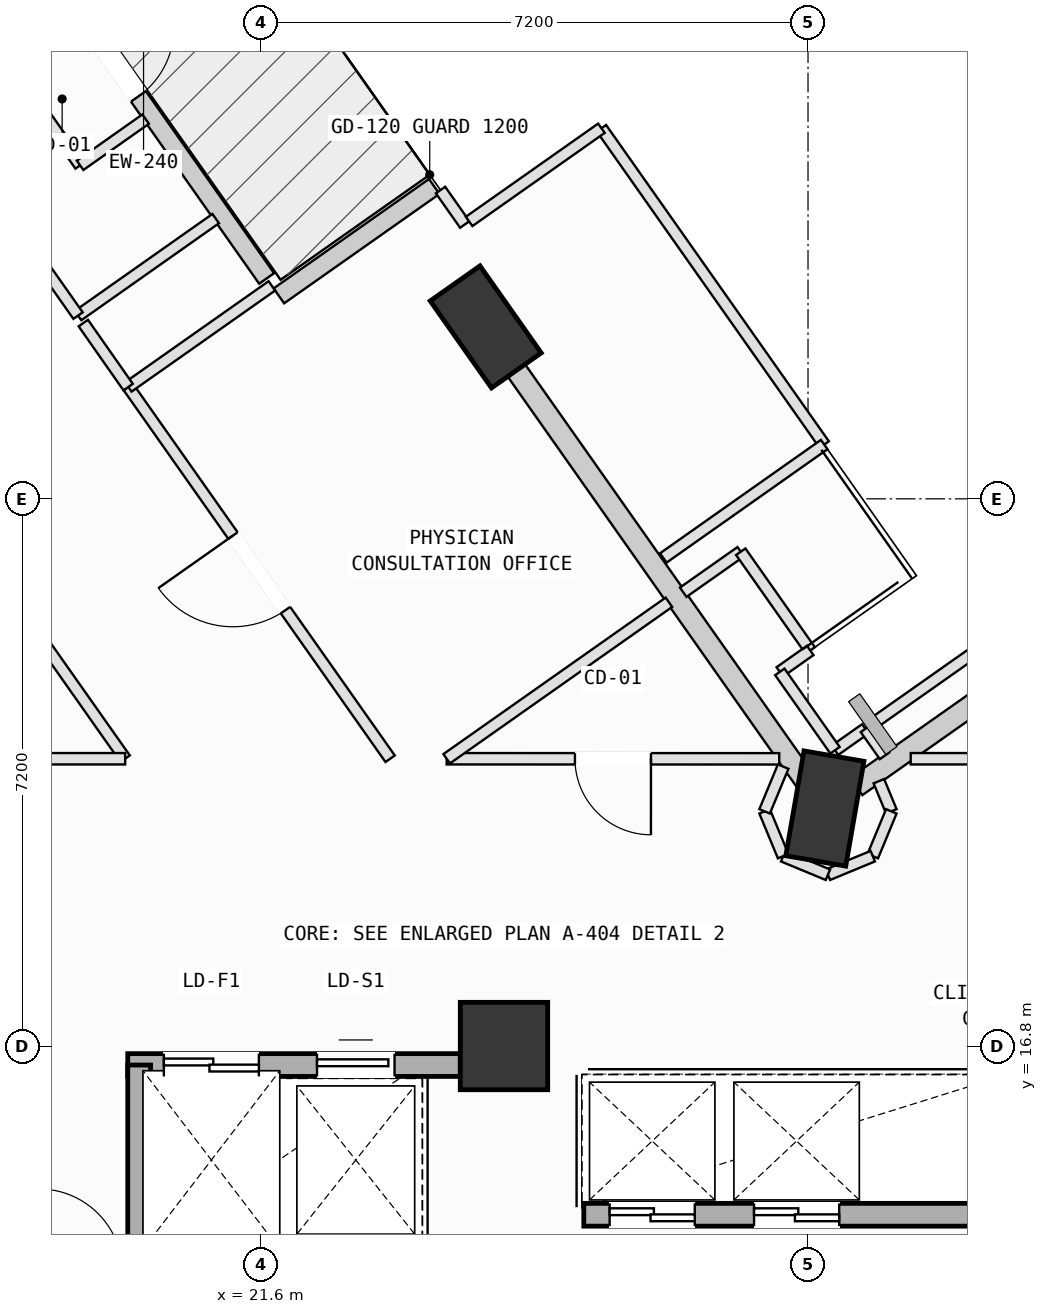
"""IFC4 building model, lengths in metres.
Left out: names, types, materials, properties, quantities, classifications, styles, units other than length and angle.
Written with IfcOpenShell. Run it as: python <this file> out.ifc"""

import sys

from ifc_helpers import new_model, si_unit, direction, frame, frame_2d, origin, origin_2d, place, context, subcontext, project, spatial, rectangle, extrude, element, fill, save


model = new_model("IFC4")
c1 = context("Model", 3, precision=1e-05, world=origin(), true_north=direction((0.0, 1.0)))
c2 = subcontext(c1, "Body", "Model", "MODEL_VIEW")
j1 = project(units=[si_unit("LENGTHUNIT", "METRE"), si_unit("PLANEANGLEUNIT", "RADIAN")], contexts=[c1])
p1 = place(None, origin())
s1 = spatial("IfcSite", under=j1, at=p1, CompositionType="ELEMENT")
p2 = place(p1, origin())
s2 = spatial("IfcBuilding", under=s1, at=p2, CompositionType="ELEMENT")
p3 = place(p2, frame((0.0, 0.0, 173.8)))
s3 = spatial("IfcBuildingStorey", under=s2, at=p3, CompositionType="ELEMENT", Elevation=173.8)
p4 = place(p3, frame((24.8, 16.8, 0.0), z_axis=(0.0, 0.0, 1.0), x_axis=(1.0, 0.0, 0.0)))
e1 = element("IfcColumn", 1, at=p4, inside=s3, PredefinedType="COLUMN", context=c2, shape_type="SweptSolid", body=[
    extrude(rectangle(XDim=1.15, YDim=1.15, at=origin_2d()), origin(), (0.0, 0.0, 1.0), 4.0),
])
p5 = place(p3, frame((29.022, 19.925, 0.002), z_axis=(0.020335525631, -0.018808834518, 0.999616273448), x_axis=(-0.606869387949, 0.794332861658, 0.027291955989)))
e2 = element("IfcColumn", 2, at=p5, inside=s3, PredefinedType="COLUMN", context=c2, shape_type="SweptSolid", body=[
    extrude(rectangle(XDim=1.4, YDim=0.8, at=origin_2d()), origin(), (0.0, 0.0, 1.0), 3.998),
])
p6 = place(p3, frame((24.56, 26.262, 0.002), z_axis=(-0.005738432057, -0.037482949817, 0.999280790804), x_axis=(-0.445441829309, 0.894773866019, 0.031004925272)))
e3 = element("IfcColumn", 3, at=p6, inside=s3, PredefinedType="COLUMN", context=c2, shape_type="SweptSolid", body=[
    extrude(rectangle(XDim=1.4, YDim=0.8, at=origin_2d()), origin(), (0.0, 0.0, 1.0), 3.999),
])
p7 = place(p3, frame((17.67, 32.59, 0.0), z_axis=(0.0, 0.0, 1.0), x_axis=(0.57573667461, -0.817635176292, 0.0)))
e4 = element("IfcWall", 4, at=p7, inside=s3, PredefinedType="SOLIDWALL", context=c2, shape_type="SweptSolid", body=[
    extrude(rectangle(XDim=6.96, YDim=0.24, at=frame_2d((3.48, 0.0))), origin(), (0.0, 0.0, 1.0), 3.265),
])
p8 = place(p7, frame((2.93, 0.0, 0.0)))
e5 = element("IfcOpeningElement", 5, at=p8, cuts=e4, PredefinedType="OPENING", context=c2, shape_type="SweptSolid", body=[
    extrude(rectangle(XDim=1.1, YDim=2.15, at=frame_2d((0.55, 1.075))), frame((0.0, 0.13, 0.0), z_axis=(0.0, -1.0, 0.0), x_axis=(1.0, 0.0, 0.0)), (0.0, 0.0, 1.0), 0.26),
])
p9 = place(p3, frame((21.838, 26.671, 0.0), z_axis=(0.0, 0.0, 1.0), x_axis=(0.817627652567, 0.575747359314, 0.0)))
e6 = element("IfcWall", 6, at=p9, inside=s3, PredefinedType="SOLIDWALL", context=c2, shape_type="SweptSolid", body=[
    extrude(rectangle(XDim=2.5, YDim=0.24, at=frame_2d((1.25, 0.0))), origin(), (0.0, 0.0, 1.0), 3.265),
])
p10 = place(p3, frame((29.435, 20.216, 0.0), z_axis=(0.0, 0.0, 1.0), x_axis=(0.817631441068, 0.575741979169, 0.0)))
e7 = element("IfcWall", 7, at=p10, inside=s3, PredefinedType="SOLIDWALL", context=c2, shape_type="SweptSolid", body=[
    extrude(rectangle(XDim=5.96, YDim=0.28, at=frame_2d((2.98, 0.0))), origin(), (0.0, 0.0, 1.0), 3.265),
])
p11 = place(p3, frame((28.767, 20.287, 0.0), z_axis=(0.0, 0.0, 1.0), x_axis=(-0.575707206598, 0.817655925357, 0.0)))
e8 = element("IfcWall", 8, at=p11, inside=s3, PredefinedType="SOLIDWALL", context=c2, shape_type="SweptSolid", body=[
    extrude(rectangle(XDim=6.76, YDim=0.28, at=frame_2d((3.38, 0.0))), origin(), (0.0, 0.0, 1.0), 3.265),
])
p12 = place(p3, frame((19.85, 16.55, 0.0), z_axis=(0.0, 0.0, 1.0), x_axis=(1.0, 0.0, 0.0)))
e9 = element("IfcWall", 9, at=p12, inside=s3, PredefinedType="SOLIDWALL", context=c2, shape_type="SweptSolid", body=[
    extrude(rectangle(XDim=4.375, YDim=0.3, at=frame_2d((2.188, 0.0))), origin(), (0.0, 0.0, 1.0), 3.78),
])
p13 = place(p12, frame((0.475, 0.0, 0.0)))
e10 = element("IfcOpeningElement", 10, at=p13, cuts=e9, PredefinedType="OPENING", context=c2, shape_type="SweptSolid", body=[
    extrude(rectangle(XDim=1.25, YDim=2.18, at=frame_2d((0.625, 1.09))), frame((0.0, 0.16, 0.0), z_axis=(0.0, -1.0, 0.0), x_axis=(1.0, 0.0, 0.0)), (0.0, 0.0, 1.0), 0.32),
])
p14 = place(p12, frame((2.49, 0.0, 0.0)))
e11 = element("IfcOpeningElement", 11, at=p14, cuts=e9, PredefinedType="OPENING", context=c2, shape_type="SweptSolid", body=[
    extrude(rectangle(XDim=1.02, YDim=2.12, at=frame_2d((0.51, 1.06))), frame((0.0, 0.16, 0.0), z_axis=(0.0, -1.0, 0.0), x_axis=(1.0, 0.0, 0.0)), (0.0, 0.0, 1.0), 0.32),
])
p15 = place(p3, frame((20.0, 13.82, 0.0), z_axis=(0.0, 0.0, 1.0), x_axis=(0.0, 1.0, 0.0)))
e12 = element("IfcWall", 12, at=p15, inside=s3, PredefinedType="SOLIDWALL", context=c2, shape_type="SweptSolid", body=[
    extrude(rectangle(XDim=2.73, YDim=0.3, at=frame_2d((1.365, 0.0))), origin(), (0.0, 0.0, 1.0), 3.78),
])
p16 = place(p3, frame((25.85, 14.58, 0.0), z_axis=(0.0, 0.0, 1.0), x_axis=(1.0, 0.0, 0.0)))
e13 = element("IfcWall", 13, at=p16, inside=s3, PredefinedType="SOLIDWALL", context=c2, shape_type="SweptSolid", body=[
    extrude(rectangle(XDim=5.45, YDim=0.3, at=frame_2d((2.725, 0.0))), origin(), (0.0, 0.0, 1.0), 3.78),
])
p17 = place(p16, frame((0.34, 0.0, 0.0)))
e14 = element("IfcOpeningElement", 14, at=p17, cuts=e13, PredefinedType="OPENING", context=c2, shape_type="SweptSolid", body=[
    extrude(rectangle(XDim=1.12, YDim=2.15, at=frame_2d((0.56, 1.075))), frame((0.0, 0.16, 0.0), z_axis=(0.0, -1.0, 0.0), x_axis=(1.0, 0.0, 0.0)), (0.0, 0.0, 1.0), 0.32),
])
p18 = place(p16, frame((2.24, 0.0, 0.0)))
e15 = element("IfcOpeningElement", 15, at=p18, cuts=e13, PredefinedType="OPENING", context=c2, shape_type="SweptSolid", body=[
    extrude(rectangle(XDim=1.12, YDim=2.15, at=frame_2d((0.56, 1.075))), frame((0.0, 0.16, 0.0), z_axis=(0.0, -1.0, 0.0), x_axis=(1.0, 0.0, 0.0)), (0.0, 0.0, 1.0), 0.32),
])
p19 = place(p3, frame((17.159, 24.353, 0.0), z_axis=(0.0, 0.0, 1.0), x_axis=(0.575775132448, -0.817608094905, 0.0)))
e16 = element("IfcWall", 16, at=p19, inside=s3, PredefinedType="PARTITIONING", context=c2, shape_type="SweptSolid", body=[
    extrude(rectangle(XDim=4.615, YDim=0.15, at=frame_2d((2.307, 0.0))), origin(), (0.0, 0.0, 1.0), 3.78),
])
p20 = place(p3, frame((19.816, 20.58, 0.0), z_axis=(0.0, 0.0, 1.0), x_axis=(-1.0, 0.0, 0.0)))
e17 = element("IfcWall", 17, at=p20, inside=s3, PredefinedType="PARTITIONING", context=c2, shape_type="SweptSolid", body=[
    extrude(rectangle(XDim=4.819, YDim=0.15, at=frame_2d((2.409, 0.0))), origin(), (0.0, 0.0, 1.0), 3.78),
])
p21 = place(p20, frame((1.81, 0.0, 0.0)))
e18 = element("IfcOpeningElement", 18, at=p21, cuts=e17, PredefinedType="OPENING", context=c2, shape_type="SweptSolid", body=[
    extrude(rectangle(XDim=1.2, YDim=2.15, at=frame_2d((0.6, 1.075))), frame((0.0, 0.085, 0.0), z_axis=(0.0, -1.0, 0.0), x_axis=(1.0, 0.0, 0.0)), (0.0, 0.0, 1.0), 0.17),
])
p22 = place(p3, frame((29.155, 20.692, 0.0), z_axis=(0.0, 0.0, 1.0), x_axis=(0.817023152975, 0.576604862539, 0.0)))
e19 = element("IfcWall", 19, at=p22, inside=s3, PredefinedType="PARTITIONING", context=c2, shape_type="SweptSolid", body=[
    extrude(rectangle(XDim=0.49, YDim=0.15, at=frame_2d((0.245, 0.0))), origin(), (0.0, 0.0, 1.0), 3.78),
])
p23 = place(p3, frame((29.555, 20.974, 0.0), z_axis=(0.0, 0.0, 1.0), x_axis=(0.575979061459, -0.817464446176, 0.0)))
e20 = element("IfcWall", 20, at=p23, inside=s3, PredefinedType="PARTITIONING", context=c2, shape_type="SweptSolid", body=[
    extrude(rectangle(XDim=0.436, YDim=0.15, at=frame_2d((0.218, 0.0))), origin(), (0.0, 0.0, 1.0), 3.78),
])
p24 = place(p3, frame((29.732, 20.285, 0.0), z_axis=(0.0, 0.0, 1.0), x_axis=(0.381950141161, -0.924182930846, 0.0)))
e21 = element("IfcWall", 21, at=p24, inside=s3, PredefinedType="PARTITIONING", context=c2, shape_type="SweptSolid", body=[
    extrude(rectangle(XDim=0.429, YDim=0.15, at=frame_2d((0.215, 0.0))), origin(), (0.0, 0.0, 1.0), 3.78),
])
p25 = place(p3, frame((29.896, 19.888, 0.0), z_axis=(0.0, 0.0, 1.0), x_axis=(-0.382115291723, -0.924114659462, 0.0)))
e22 = element("IfcWall", 22, at=p25, inside=s3, PredefinedType="PARTITIONING", context=c2, shape_type="SweptSolid", body=[
    extrude(rectangle(XDim=0.638, YDim=0.15, at=frame_2d((0.319, 0.0))), origin(), (0.0, 0.0, 1.0), 3.78),
])
p26 = place(p3, frame((29.652, 19.298, 0.0), z_axis=(0.0, 0.0, 1.0), x_axis=(-0.924035461503, -0.382306769343, 0.0)))
e23 = element("IfcWall", 23, at=p26, inside=s3, PredefinedType="PARTITIONING", context=c2, shape_type="SweptSolid", body=[
    extrude(rectangle(XDim=0.639, YDim=0.15, at=frame_2d((0.319, 0.0))), origin(), (0.0, 0.0, 1.0), 3.415),
])
p27 = place(p3, frame((29.062, 19.054, 0.0), z_axis=(0.0, 0.0, 1.0), x_axis=(-0.923811477415, 0.382847690599, 0.0)))
e24 = element("IfcWall", 24, at=p27, inside=s3, PredefinedType="PARTITIONING", context=c2, shape_type="SweptSolid", body=[
    extrude(rectangle(XDim=0.638, YDim=0.15, at=frame_2d((0.319, 0.0))), origin(), (0.0, 0.0, 1.0), 3.78),
])
p28 = place(p3, frame((28.473, 19.298, 0.0), z_axis=(0.0, 0.0, 1.0), x_axis=(-0.382115291723, 0.924114659462, 0.0)))
e25 = element("IfcWall", 25, at=p28, inside=s3, PredefinedType="PARTITIONING", context=c2, shape_type="SweptSolid", body=[
    extrude(rectangle(XDim=0.638, YDim=0.15, at=frame_2d((0.319, 0.0))), origin(), (0.0, 0.0, 1.0), 3.78),
])
p29 = place(p3, frame((28.229, 19.888, 0.0), z_axis=(0.0, 0.0, 1.0), x_axis=(0.382520885967, 0.923946844683, 0.0)))
e26 = element("IfcWall", 26, at=p29, inside=s3, PredefinedType="PARTITIONING", context=c2, shape_type="SweptSolid", body=[
    extrude(rectangle(XDim=0.638, YDim=0.15, at=frame_2d((0.319, 0.0))), origin(), (0.0, 0.0, 1.0), 3.78),
])
p30 = place(p3, frame((28.421, 20.579, 0.0), z_axis=(0.0, 0.0, 1.0), x_axis=(-0.999999975088, 0.00022321428, 0.0)))
e27 = element("IfcWall", 27, at=p30, inside=s3, PredefinedType="PARTITIONING", context=c2, shape_type="SweptSolid", body=[
    extrude(rectangle(XDim=4.375, YDim=0.15, at=frame_2d((2.188, 0.0))), origin(), (0.0, 0.0, 1.0), 3.78),
])
p31 = place(p30, frame((1.688, 0.0, 0.0)))
e28 = element("IfcOpeningElement", 28, at=p31, cuts=e27, PredefinedType="OPENING", context=c2, shape_type="SweptSolid", body=[
    extrude(rectangle(XDim=1.0, YDim=2.12, at=frame_2d((0.5, 1.06))), frame((0.0, 0.085, 0.0), z_axis=(0.0, -1.0, 0.0), x_axis=(1.0, 0.0, 0.0)), (0.0, 0.0, 1.0), 0.17),
])
p32 = place(p3, frame((24.046, 20.58, 0.0), z_axis=(0.0, 0.0, 1.0), x_axis=(0.817654070061, 0.575709841598, 0.0)))
e29 = element("IfcWall", 29, at=p32, inside=s3, PredefinedType="PARTITIONING", context=c2, shape_type="SweptSolid", body=[
    extrude(rectangle(XDim=3.576, YDim=0.15, at=frame_2d((1.788, 0.0))), origin(), (0.0, 0.0, 1.0), 3.78),
])
p33 = place(p3, frame((27.158, 22.771, 0.0), z_axis=(0.0, 0.0, 1.0), x_axis=(0.817705284869, 0.575637096701, 0.0)))
e30 = element("IfcWall", 30, at=p33, inside=s3, PredefinedType="PARTITIONING", context=c2, shape_type="SweptSolid", body=[
    extrude(rectangle(XDim=0.926, YDim=0.15, at=frame_2d((0.463, 0.0))), origin(), (0.0, 0.0, 1.0), 3.78),
])
p34 = place(p3, frame((27.915, 23.304, 0.0), z_axis=(0.0, 0.0, 1.0), x_axis=(0.575451525788, -0.817835889081, 0.0)))
e31 = element("IfcWall", 31, at=p34, inside=s3, PredefinedType="PARTITIONING", context=c2, shape_type="SweptSolid", body=[
    extrude(rectangle(XDim=1.588, YDim=0.15, at=frame_2d((0.794, 0.0))), origin(), (0.0, 0.0, 1.0), 3.78),
])
p35 = place(p3, frame((28.829, 22.005, 0.0), z_axis=(0.0, 0.0, 1.0), x_axis=(-0.817423724009, -0.57603685249, 0.0)))
e32 = element("IfcWall", 32, at=p35, inside=s3, PredefinedType="PARTITIONING", context=c2, shape_type="SweptSolid", body=[
    extrude(rectangle(XDim=0.49, YDim=0.15, at=frame_2d((0.245, 0.0))), origin(), (0.0, 0.0, 1.0), 3.78),
])
p36 = place(p3, frame((28.429, 21.723, 0.0), z_axis=(0.0, 0.0, 1.0), x_axis=(0.575785910644, -0.817600504589, 0.0)))
e33 = element("IfcWall", 33, at=p36, inside=s3, PredefinedType="PARTITIONING", context=c2, shape_type="SweptSolid", body=[
    extrude(rectangle(XDim=1.261, YDim=0.15, at=frame_2d((0.63, 0.0))), origin(), (0.0, 0.0, 1.0), 3.78),
])
p37 = place(p3, frame((31.17, 20.58, 0.0), z_axis=(0.0, 0.0, 1.0), x_axis=(-1.0, 0.0, 0.0)))
e34 = element("IfcWall", 34, at=p37, inside=s3, PredefinedType="PARTITIONING", context=c2, shape_type="SweptSolid", body=[
    extrude(rectangle(XDim=1.019, YDim=0.15, at=frame_2d((0.51, 0.0))), origin(), (0.0, 0.0, 1.0), 3.78),
])
p38 = place(p3, frame((29.653, 21.043, 0.0), z_axis=(0.0, 0.0, 1.0), x_axis=(0.817695812803, 0.575650551746, 0.0)))
e35 = element("IfcWall", 35, at=p38, inside=s3, PredefinedType="PARTITIONING", context=c2, shape_type="SweptSolid", body=[
    extrude(rectangle(XDim=5.618, YDim=0.15, at=frame_2d((2.809, 0.0))), origin(), (0.0, 0.0, 1.0), 3.78),
])
p39 = place(p3, frame((23.302, 20.58, 0.0), z_axis=(0.0, 0.0, 1.0), x_axis=(-0.575790528848, 0.817597252252, 0.0)))
e36 = element("IfcWall", 36, at=p39, inside=s3, PredefinedType="PARTITIONING", context=c2, shape_type="SweptSolid", body=[
    extrude(rectangle(XDim=5.983, YDim=0.15, at=frame_2d((2.992, 0.0))), origin(), (0.0, 0.0, 1.0), 3.78),
])
p40 = place(p39, frame((2.392, 0.0, 0.0)))
e37 = element("IfcOpeningElement", 37, at=p40, cuts=e36, PredefinedType="OPENING", context=c2, shape_type="SweptSolid", body=[
    extrude(rectangle(XDim=1.2, YDim=2.15, at=frame_2d((0.6, 1.075))), frame((0.0, 0.085, 0.0), z_axis=(0.0, -1.0, 0.0), x_axis=(1.0, 0.0, 0.0)), (0.0, 0.0, 1.0), 0.17),
])
p41 = place(p3, frame((19.857, 25.472, 0.0), z_axis=(0.0, 0.0, 1.0), x_axis=(0.817670092485, 0.575687085017, 0.0)))
e38 = element("IfcWall", 38, at=p41, inside=s3, PredefinedType="PARTITIONING", context=c2, shape_type="SweptSolid", body=[
    extrude(rectangle(XDim=2.31, YDim=0.15, at=frame_2d((1.155, 0.0))), origin(), (0.0, 0.0, 1.0), 3.78),
])
p42 = place(p3, frame((23.965, 28.063, 0.0), z_axis=(0.0, 0.0, 1.0), x_axis=(0.575679010769, -0.817675777164, 0.0)))
e39 = element("IfcWall", 39, at=p42, inside=s3, PredefinedType="PARTITIONING", context=c2, shape_type="SweptSolid", body=[
    extrude(rectangle(XDim=0.554, YDim=0.15, at=frame_2d((0.277, 0.0))), origin(), (0.0, 0.0, 1.0), 3.78),
])
p43 = place(p3, frame((19.106, 30.385, 0.0), z_axis=(0.0, 0.0, 1.0), x_axis=(-0.817673191609, -0.575682683189, 0.0)))
e40 = element("IfcWall", 40, at=p43, inside=s3, PredefinedType="PARTITIONING", context=c2, shape_type="SweptSolid", body=[
    extrude(rectangle(XDim=1.054, YDim=0.15, at=frame_2d((0.527, 0.0))), origin(), (0.0, 0.0, 1.0), 3.78),
])
p44 = place(p3, frame((18.244, 29.778, 0.0), z_axis=(0.0, 0.0, 1.0), x_axis=(0.575792138405, -0.817596118723, 0.0)))
e41 = element("IfcWall", 41, at=p44, inside=s3, PredefinedType="PARTITIONING", context=c2, shape_type="SweptSolid", body=[
    extrude(rectangle(XDim=1.7, YDim=0.15, at=frame_2d((0.85, 0.0))), origin(), (0.0, 0.0, 1.0), 3.78),
])
p45 = place(p3, frame((19.223, 28.388, 0.0), z_axis=(0.0, 0.0, 1.0), x_axis=(0.817128165761, 0.576456035375, 0.0)))
e42 = element("IfcWall", 42, at=p45, inside=s3, PredefinedType="PARTITIONING", context=c2, shape_type="SweptSolid", body=[
    extrude(rectangle(XDim=1.055, YDim=0.15, at=frame_2d((0.527, 0.0))), origin(), (0.0, 0.0, 1.0), 3.78),
])
p46 = place(p3, frame((21.007, 27.687, 0.0), z_axis=(0.0, 0.0, 1.0), x_axis=(-0.817447055708, -0.576003742274, 0.0)))
e43 = element("IfcWall", 43, at=p46, inside=s3, PredefinedType="PARTITIONING", context=c2, shape_type="SweptSolid", body=[
    extrude(rectangle(XDim=2.216, YDim=0.15, at=frame_2d((1.108, 0.0))), origin(), (0.0, 0.0, 1.0), 3.78),
])
p47 = place(p3, frame((19.196, 26.411, 0.0), z_axis=(0.0, 0.0, 1.0), x_axis=(-0.575756218834, 0.817621413903, 0.0)))
e44 = element("IfcWall", 44, at=p47, inside=s3, PredefinedType="PARTITIONING", context=c2, shape_type="SweptSolid", body=[
    extrude(rectangle(XDim=5.131, YDim=0.15, at=frame_2d((2.565, 0.0))), origin(), (0.0, 0.0, 1.0), 3.78),
])
p48 = place(p47, frame((2.105, 0.0, 0.0)))
e45 = element("IfcOpeningElement", 45, at=p48, cuts=e44, PredefinedType="OPENING", context=c2, shape_type="SweptSolid", body=[
    extrude(rectangle(XDim=0.92, YDim=2.1, at=frame_2d((0.46, 1.05))), frame((0.0, 0.085, 0.0), z_axis=(0.0, -1.0, 0.0), x_axis=(1.0, 0.0, 0.0)), (0.0, 0.0, 1.0), 0.17),
])
p49 = place(p3, frame((19.265, 26.313, 0.0), z_axis=(0.0, 0.0, 1.0), x_axis=(0.57344642107, -0.819243066593, 0.0)))
e46 = element("IfcWall", 46, at=p49, inside=s3, PredefinedType="PARTITIONING", context=c2, shape_type="SweptSolid", body=[
    extrude(rectangle(XDim=1.029, YDim=0.15, at=frame_2d((0.515, 0.0))), origin(), (0.0, 0.0, 1.0), 3.78),
])
p50 = place(p3, frame((26.082, 28.876, 0.0), z_axis=(0.0, 0.0, 1.0), x_axis=(0.575780877136, -0.817604049357, 0.0)))
e47 = element("IfcWall", 47, at=p50, inside=s3, PredefinedType="PARTITIONING", context=c2, shape_type="SweptSolid", body=[
    extrude(rectangle(XDim=5.09, YDim=0.15, at=frame_2d((2.545, 0.0))), origin(), (0.0, 0.0, 1.0), 3.78),
])
p51 = place(p3, frame((29.013, 24.714, 0.0), z_axis=(0.0, 0.0, 1.0), x_axis=(-0.817354310267, -0.576135341293, 0.0)))
e48 = element("IfcWall", 48, at=p51, inside=s3, PredefinedType="PARTITIONING", context=c2, shape_type="SweptSolid", body=[
    extrude(rectangle(XDim=2.59, YDim=0.15, at=frame_2d((1.295, 0.0))), origin(), (0.0, 0.0, 1.0), 3.78),
])
p52 = place(p3, frame((24.341, 27.65, 0.0), z_axis=(0.0, 0.0, 1.0), x_axis=(0.817596516853, 0.57579157308, 0.0)))
e49 = element("IfcWall", 49, at=p52, inside=s3, PredefinedType="PARTITIONING", context=c2, shape_type="SweptSolid", body=[
    extrude(rectangle(XDim=2.129, YDim=0.15, at=frame_2d((1.065, 0.0))), origin(), (0.0, 0.0, 1.0), 3.78),
])
p53 = place(p8, origin())
e50 = element("IfcDoor", 50, at=p53, inside=s3, OperationType="SINGLE_SWING_LEFT", PredefinedType="DOOR", context=c2, shape_type="SweptSolid", body=[
    extrude(rectangle(XDim=1.1, YDim=2.15, at=frame_2d((0.55, 1.075))), frame((0.0, 0.025, 0.0), z_axis=(0.0, -1.0, 0.0), x_axis=(1.0, 0.0, 0.0)), (0.0, 0.0, 1.0), 0.05),
])
fill(e5, e50)
p54 = place(p17, origin())
e51 = element("IfcDoor", 51, at=p54, inside=s3, OperationType="DOUBLE_DOOR_SLIDING", PredefinedType="DOOR", context=c2, shape_type="SweptSolid", body=[
    extrude(rectangle(XDim=1.12, YDim=2.15, at=frame_2d((0.56, 1.075))), frame((0.0, 0.025, 0.0), z_axis=(0.0, -1.0, 0.0), x_axis=(1.0, 0.0, 0.0)), (0.0, 0.0, 1.0), 0.05),
])
fill(e14, e51)
p55 = place(p18, origin())
e52 = element("IfcDoor", 52, at=p55, inside=s3, OperationType="DOUBLE_DOOR_SLIDING", PredefinedType="DOOR", context=c2, shape_type="SweptSolid", body=[
    extrude(rectangle(XDim=1.12, YDim=2.15, at=frame_2d((0.56, 1.075))), frame((0.0, 0.025, 0.0), z_axis=(0.0, -1.0, 0.0), x_axis=(1.0, 0.0, 0.0)), (0.0, 0.0, 1.0), 0.05),
])
fill(e15, e52)
p56 = place(p13, origin())
e53 = element("IfcDoor", 53, at=p56, inside=s3, OperationType="DOUBLE_DOOR_SLIDING", PredefinedType="DOOR", context=c2, shape_type="SweptSolid", body=[
    extrude(rectangle(XDim=1.25, YDim=2.18, at=frame_2d((0.625, 1.09))), frame((0.0, 0.025, 0.0), z_axis=(0.0, -1.0, 0.0), x_axis=(1.0, 0.0, 0.0)), (0.0, 0.0, 1.0), 0.05),
])
fill(e10, e53)
p57 = place(p14, origin())
e54 = element("IfcDoor", 54, at=p57, inside=s3, OperationType="SLIDING_TO_LEFT", PredefinedType="DOOR", context=c2, shape_type="SweptSolid", body=[
    extrude(rectangle(XDim=1.02, YDim=2.12, at=frame_2d((0.51, 1.06))), frame((0.0, 0.025, 0.0), z_axis=(0.0, -1.0, 0.0), x_axis=(1.0, 0.0, 0.0)), (0.0, 0.0, 1.0), 0.05),
])
fill(e11, e54)
p58 = place(p31, origin())
e55 = element("IfcDoor", 55, at=p58, inside=s3, OperationType="SINGLE_SWING_LEFT", PredefinedType="DOOR", context=c2, shape_type="SweptSolid", body=[
    extrude(rectangle(XDim=1.0, YDim=2.12, at=frame_2d((0.5, 1.06))), frame((0.0, 0.025, 0.0), z_axis=(0.0, -1.0, 0.0), x_axis=(1.0, 0.0, 0.0)), (0.0, 0.0, 1.0), 0.05),
])
fill(e28, e55)
p59 = place(p40, origin())
e56 = element("IfcDoor", 56, at=p59, inside=s3, OperationType="SINGLE_SWING_RIGHT", PredefinedType="DOOR", context=c2, shape_type="SweptSolid", body=[
    extrude(rectangle(XDim=1.2, YDim=2.15, at=frame_2d((0.6, 1.075))), frame((0.0, 0.025, 0.0), z_axis=(0.0, -1.0, 0.0), x_axis=(1.0, 0.0, 0.0)), (0.0, 0.0, 1.0), 0.05),
])
fill(e37, e56)
save(model, sys.argv[1])
